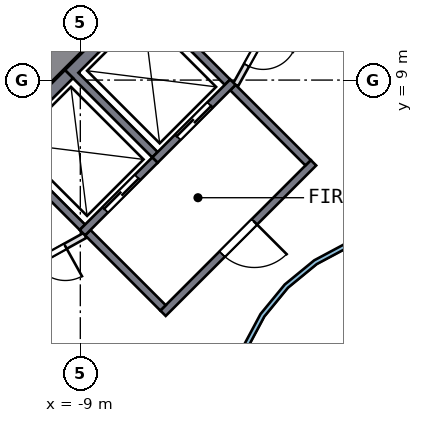
"""IFC4 building model, lengths in metres.
Left out: names, types, materials, properties, quantities, classifications, styles, units other than length and angle.
Written with IfcOpenShell. Run it as: python <this file> out.ifc"""

import sys

from ifc_helpers import new_model, si_unit, direction, frame, frame_2d, origin, place, context, subcontext, project, spatial, polyline, rectangle, outline, extrude, element, fill, save


model = new_model("IFC4")
c1 = context("Model", 3, precision=1e-05, world=origin(), true_north=direction((0.0, 1.0)))
c2 = subcontext(c1, "Body", "Model", "MODEL_VIEW")
j1 = project(units=[si_unit("LENGTHUNIT", "METRE"), si_unit("PLANEANGLEUNIT", "RADIAN")], contexts=[c1])
p1 = place(None, origin())
s1 = spatial("IfcSite", under=j1, at=p1, CompositionType="ELEMENT")
p2 = place(p1, origin())
s2 = spatial("IfcBuilding", under=s1, at=p2, CompositionType="ELEMENT")
p3 = place(p2, frame((0.0, 0.0, 103.5)))
s3 = spatial("IfcBuildingStorey", under=s2, at=p3, CompositionType="ELEMENT", Elevation=103.5)
p4 = place(p3, frame((-5.516, 13.717, 0.0), z_axis=(0.0, 0.0, 1.0), x_axis=(-0.707106781, -0.707106781, 0.0)))
e1 = element("IfcWall", 1, at=p4, inside=s3, PredefinedType="SHEAR", context=c2, shape_type="SweptSolid", body=[
    extrude(rectangle(XDim=11.598, YDim=0.8, at=frame_2d((5.799, 0.0))), origin(), (0.0, 0.0, 1.0), 3.5),
])
p5 = place(p3, origin())
e2 = element("IfcWall", 2, at=p5, inside=s3, PredefinedType="SOLIDWALL", context=c2, shape_type="SweptSolid", body=[
    extrude(outline(polyline([(-9.405, 9.263), (-7.354, 11.314), (-5.056, 9.016), (-5.197, 8.874), (-7.283, 10.96), (-9.051, 9.192), (-6.965, 7.106), (-7.106, 6.965), (-9.405, 9.263)])), origin(), (0.0, 0.0, 1.0), 3.19),
])
p6 = place(p3, frame((-4.985, 8.945, 0.0), z_axis=(0.0, 0.0, 1.0), x_axis=(-0.707106781, -0.707106781, 0.0)))
e3 = element("IfcWall", 3, at=p6, inside=s3, PredefinedType="SOLIDWALL", context=c2, shape_type="SweptSolid", body=[
    extrude(rectangle(XDim=2.9, YDim=0.2, at=frame_2d((1.45, 0.0))), origin(), (0.0, 0.0, 1.0), 3.19),
])
p7 = place(p6, frame((0.85, 0.0, 0.0)))
e4 = element("IfcOpeningElement", 4, at=p7, cuts=e3, PredefinedType="OPENING", context=c2, shape_type="SweptSolid", body=[
    extrude(rectangle(XDim=1.2, YDim=2.1, at=frame_2d((0.6, 1.05))), frame((0.0, 0.11, 0.0), z_axis=(0.0, -1.0, 0.0), x_axis=(1.0, 0.0, 0.0)), (0.0, 0.0, 1.0), 0.22),
])
p8 = place(p3, origin())
e5 = element("IfcWall", 5, at=p8, inside=s3, PredefinedType="SOLIDWALL", context=c2, shape_type="SweptSolid", body=[
    extrude(outline(polyline([(-11.314, 7.354), (-9.405, 9.263), (-9.192, 9.051), (-10.96, 7.283), (-8.874, 5.197), (-9.016, 5.056), (-11.314, 7.354)])), origin(), (0.0, 0.0, 1.0), 3.19),
])
p9 = place(p3, frame((-7.036, 6.894, 0.0), z_axis=(0.0, 0.0, 1.0), x_axis=(-0.707106781, -0.707106781, 0.0)))
e6 = element("IfcWall", 6, at=p9, inside=s3, PredefinedType="SOLIDWALL", context=c2, shape_type="SweptSolid", body=[
    extrude(rectangle(XDim=2.7, YDim=0.2, at=frame_2d((1.35, 0.0))), origin(), (0.0, 0.0, 1.0), 3.19),
])
p10 = place(p9, frame((0.65, 0.0, 0.0)))
e7 = element("IfcOpeningElement", 7, at=p10, cuts=e6, PredefinedType="OPENING", context=c2, shape_type="SweptSolid", body=[
    extrude(rectangle(XDim=1.2, YDim=2.1, at=frame_2d((0.6, 1.05))), frame((0.0, 0.11, 0.0), z_axis=(0.0, -1.0, 0.0), x_axis=(1.0, 0.0, 0.0)), (0.0, 0.0, 1.0), 0.22),
])
p11 = place(p3, frame((-2.864, 6.823, 0.0), z_axis=(0.0, 0.0, 1.0), x_axis=(-0.707106781, -0.707106781, 0.0)))
e8 = element("IfcWall", 8, at=p11, inside=s3, PredefinedType="SOLIDWALL", context=c2, shape_type="SweptSolid", body=[
    extrude(rectangle(XDim=5.6, YDim=0.2, at=frame_2d((2.8, 0.0))), origin(), (0.0, 0.0, 1.0), 3.19),
])
p12 = place(p11, frame((2.2, 0.0, 0.0)))
e9 = element("IfcOpeningElement", 9, at=p12, cuts=e8, PredefinedType="OPENING", context=c2, shape_type="SweptSolid", body=[
    extrude(rectangle(XDim=1.2, YDim=2.1, at=frame_2d((0.6, 1.05))), frame((0.0, 0.11, 0.0), z_axis=(0.0, -1.0, 0.0), x_axis=(1.0, 0.0, 0.0)), (0.0, 0.0, 1.0), 0.22),
])
for number, where, z_axis, x_axis in (
    (10, (-3.005, 6.823, 0.0), (0.0, 0.0, 1.0), (-0.707, 0.707, 0.0)),
    (11, (-6.823, 3.005, 0.0), (0.0, 0.0, 1.0), (-0.707, 0.707, 0.0)),
):
    element("IfcWall", number, at=place(p3, frame(where, z_axis=z_axis, x_axis=x_axis)), inside=s3, PredefinedType="SOLIDWALL", context=c2, shape_type="SweptSolid", body=[
        extrude(rectangle(XDim=2.8, YDim=0.2, at=frame_2d((1.4, 0.0))), origin(), (0.0, 0.0, 1.0), 3.19),
    ])
p13 = place(p3, frame((-3.9, 10.7, 0.0), z_axis=(0.0, 0.0, 1.0), x_axis=(-0.485692555, -0.874129705, 0.0)))
e12 = element("IfcWall", 12, at=p13, inside=s3, PredefinedType="PARTITIONING", context=c2, shape_type="SweptSolid", body=[
    extrude(rectangle(XDim=2.089, YDim=0.15, at=frame_2d((1.044, 0.0))), origin(), (0.0, 0.0, 1.0), 3.19),
])
p14 = place(p13, frame((0.594, 0.0, 0.0)))
e13 = element("IfcOpeningElement", 13, at=p14, cuts=e12, PredefinedType="OPENING", context=c2, shape_type="SweptSolid", body=[
    extrude(rectangle(XDim=0.9, YDim=2.1, at=frame_2d((0.45, 1.05))), frame((0.0, 0.085, 0.0), z_axis=(0.0, -1.0, 0.0), x_axis=(1.0, 0.0, 0.0)), (0.0, 0.0, 1.0), 0.17),
])
p15 = place(p3, frame((-8.874, 4.914, 0.0), z_axis=(0.0, 0.0, 1.0), x_axis=(-0.874129705, -0.485692555, 0.0)))
e14 = element("IfcWall", 14, at=p15, inside=s3, PredefinedType="PARTITIONING", context=c2, shape_type="SweptSolid", body=[
    extrude(rectangle(XDim=2.089, YDim=0.15, at=frame_2d((1.044, 0.0))), origin(), (0.0, 0.0, 1.0), 3.19),
])
p16 = place(p15, frame((0.594, 0.0, 0.0)))
e15 = element("IfcOpeningElement", 15, at=p16, cuts=e14, PredefinedType="OPENING", context=c2, shape_type="SweptSolid", body=[
    extrude(rectangle(XDim=0.9, YDim=2.1, at=frame_2d((0.45, 1.05))), frame((0.0, 0.085, 0.0), z_axis=(0.0, -1.0, 0.0), x_axis=(1.0, 0.0, 0.0)), (0.0, 0.0, 1.0), 0.17),
])
p17 = place(p3, origin())
e16 = element("IfcWall", 16, at=p17, inside=s3, PredefinedType="SOLIDWALL", context=c2, shape_type="SweptSolid", body=[
    extrude(outline(polyline([(5.021, -0.999), (4.73, -1.959), (4.257, -2.844), (3.62, -3.62), (2.844, -4.257), (1.959, -4.73), (0.999, -5.021), (0.0, -5.12), (-0.999, -5.021), (-1.959, -4.73), (-2.844, -4.257), (-3.62, -3.62), (-4.257, -2.844), (-4.73, -1.959), (-5.021, -0.999), (-5.12, 0.0), (-5.021, 0.999), (-4.73, 1.959), (-4.257, 2.844), (-3.62, 3.62), (-2.844, 4.257), (-1.959, 4.73), (-0.999, 5.021), (0.0, 5.12), (0.999, 5.021), (1.959, 4.73), (2.844, 4.257), (3.62, 3.62), (4.257, 2.844), (4.73, 1.959), (5.021, 0.999), (5.12, 0.0), (5.021, -0.999)]), holes=[polyline([(4.904, 0.976), (4.619, 1.913), (4.157, 2.778), (3.535, 3.535), (2.778, 4.157), (1.913, 4.619), (0.976, 4.904), (0.0, 5.0), (-0.976, 4.904), (-1.913, 4.619), (-2.778, 4.157), (-3.535, 3.535), (-4.157, 2.778), (-4.619, 1.913), (-4.904, 0.976), (-5.0, 0.0), (-4.904, -0.976), (-4.619, -1.913), (-4.157, -2.778), (-3.535, -3.535), (-2.778, -4.157), (-1.913, -4.619), (-0.976, -4.904), (0.0, -5.0), (0.976, -4.904), (1.913, -4.619), (2.778, -4.157), (3.535, -3.535), (4.157, -2.778), (4.619, -1.913), (4.904, -0.976), (5.0, 0.0), (4.904, 0.976)])]), origin(), (0.0, 0.0, 1.0), 3.19),
])
p18 = place(p7, origin())
e17 = element("IfcDoor", 17, at=p18, inside=s3, OperationType="DOUBLE_DOOR_SLIDING", PredefinedType="DOOR", context=c2, shape_type="SweptSolid", body=[
    extrude(rectangle(XDim=1.2, YDim=2.1, at=frame_2d((0.6, 1.05))), frame((0.0, 0.025, 0.0), z_axis=(0.0, -1.0, 0.0), x_axis=(1.0, 0.0, 0.0)), (0.0, 0.0, 1.0), 0.05),
])
fill(e4, e17)
p19 = place(p10, origin())
e18 = element("IfcDoor", 18, at=p19, inside=s3, OperationType="DOUBLE_DOOR_SLIDING", PredefinedType="DOOR", context=c2, shape_type="SweptSolid", body=[
    extrude(rectangle(XDim=1.2, YDim=2.1, at=frame_2d((0.6, 1.05))), frame((0.0, 0.025, 0.0), z_axis=(0.0, -1.0, 0.0), x_axis=(1.0, 0.0, 0.0)), (0.0, 0.0, 1.0), 0.05),
])
fill(e7, e18)
p20 = place(p12, origin())
e19 = element("IfcDoor", 19, at=p20, inside=s3, OperationType="SINGLE_SWING_LEFT", PredefinedType="DOOR", context=c2, shape_type="SweptSolid", body=[
    extrude(rectangle(XDim=1.2, YDim=2.1, at=frame_2d((0.6, 1.05))), frame((0.0, 0.025, 0.0), z_axis=(0.0, -1.0, 0.0), x_axis=(1.0, 0.0, 0.0)), (0.0, 0.0, 1.0), 0.05),
])
fill(e9, e19)
p21 = place(p14, origin())
e20 = element("IfcDoor", 20, at=p21, inside=s3, OperationType="SINGLE_SWING_LEFT", PredefinedType="DOOR", context=c2, shape_type="SweptSolid", body=[
    extrude(rectangle(XDim=0.9, YDim=2.1, at=frame_2d((0.45, 1.05))), frame((0.0, 0.025, 0.0), z_axis=(0.0, -1.0, 0.0), x_axis=(1.0, 0.0, 0.0)), (0.0, 0.0, 1.0), 0.05),
])
fill(e13, e20)
p22 = place(p16, origin())
e21 = element("IfcDoor", 21, at=p22, inside=s3, OperationType="SINGLE_SWING_LEFT", PredefinedType="DOOR", context=c2, shape_type="SweptSolid", body=[
    extrude(rectangle(XDim=0.9, YDim=2.1, at=frame_2d((0.45, 1.05))), frame((0.0, 0.025, 0.0), z_axis=(0.0, -1.0, 0.0), x_axis=(1.0, 0.0, 0.0)), (0.0, 0.0, 1.0), 0.05),
])
fill(e15, e21)
save(model, sys.argv[1])
